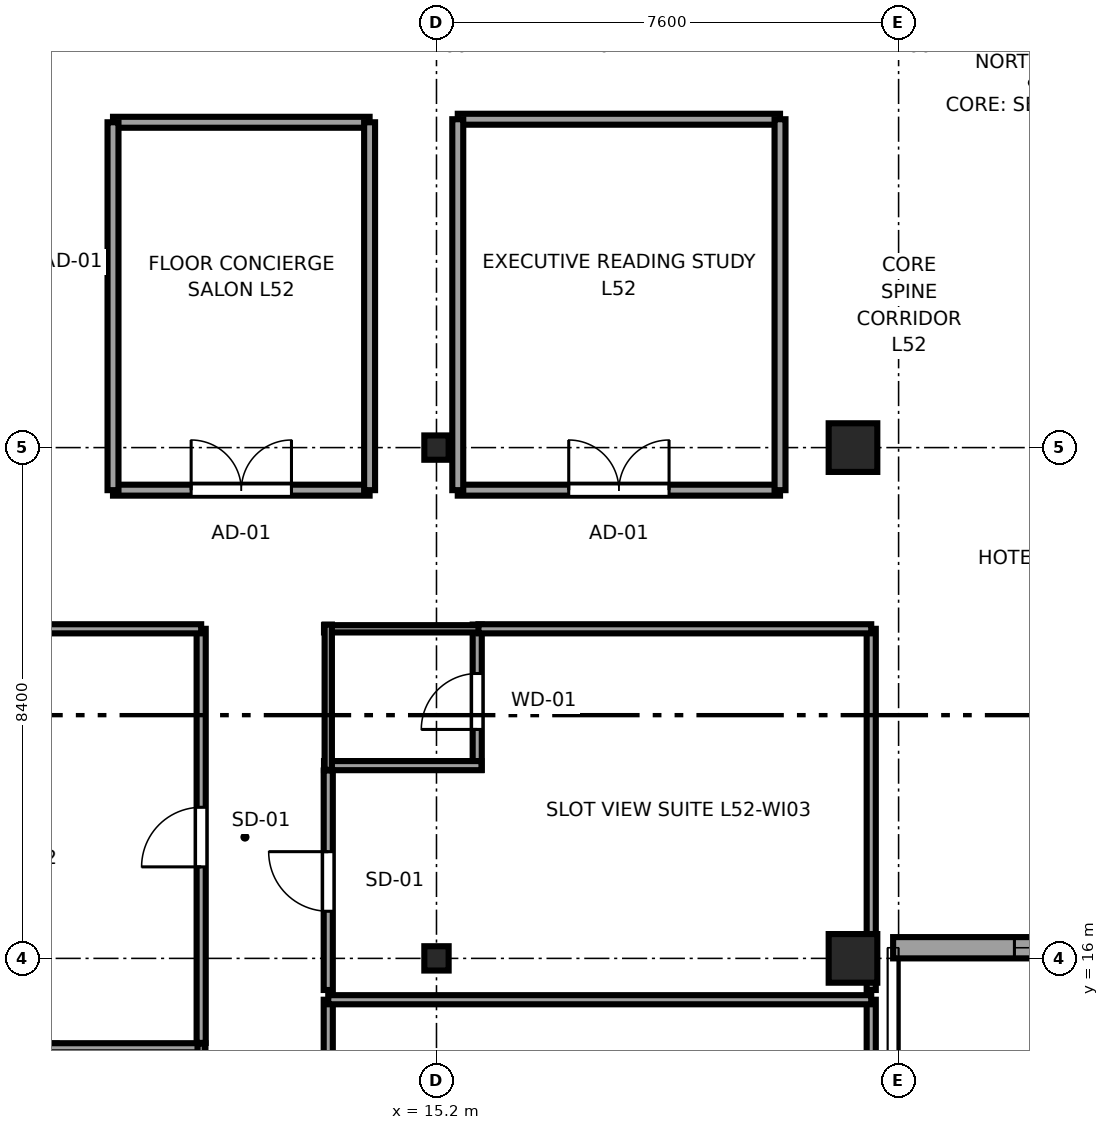
"""IFC4 building model, lengths in metres.
Left out: names, types, materials, properties, quantities, classifications, styles, units other than length and angle.
Written with IfcOpenShell. Run it as: python <this file> out.ifc"""

import sys

from ifc_helpers import new_model, si_unit, direction, frame, frame_2d, origin, origin_2d, place, context, subcontext, project, spatial, rectangle, i_section, extrude, source, transform, mapped, element, fill, save


model = new_model("IFC4")
c1 = context("Model", 3, precision=1e-05, world=origin(), true_north=direction((0.0, 1.0)))
c2 = subcontext(c1, "Body", "Model", "MODEL_VIEW")
j1 = project(units=[si_unit("LENGTHUNIT", "METRE"), si_unit("PLANEANGLEUNIT", "RADIAN")], contexts=[c1])
p1 = place(None, origin())
s1 = spatial("IfcSite", under=j1, at=p1, CompositionType="ELEMENT")
p2 = place(p1, origin())
s2 = spatial("IfcBuilding", under=s1, at=p2, CompositionType="ELEMENT")
p3 = place(p2, frame((0.0, 0.0, 198.2)))
s3 = spatial("IfcBuildingStorey", under=s2, at=p3, CompositionType="ELEMENT", Elevation=198.2)
m1 = source(origin(), c2, "Body", "SweptSolid", [
    extrude(i_section(OverallWidth=0.4, OverallDepth=0.4, WebThickness=0.02, FlangeThickness=0.035, at=origin_2d()), origin(), (0.0, 0.0, 1.0), 3.55),
])
for number, where, z_axis, x_axis in (
    (1, (15.2, 16.0, 0.0), (0.0, 0.0, 1.0), (1.0, 0.0, 0.0)),
    (2, (15.2, 24.4, 0.0), (0.0, 0.0, 1.0), (1.0, 0.0, 0.0)),
):
    element("IfcColumn", number, at=place(p3, frame(where, z_axis=z_axis, x_axis=x_axis)), inside=s3, PredefinedType="COLUMN", context=c2, shape_type="MappedRepresentation", body=[
        mapped(m1, transform((0.0, 0.0, 0.0), x_axis=(1.0, 0.0, 0.0), y_axis=(0.0, 1.0, 0.0), z_axis=(0.0, 0.0, 1.0), scale=1.0)),
    ])
m2 = source(origin(), c2, "Body", "SweptSolid", [
    extrude(rectangle(XDim=0.8, YDim=0.8, at=origin_2d()), origin(), (0.0, 0.0, 1.0), 3.55),
])
for number, where, z_axis, x_axis in (
    (3, (22.05, 16.0, 0.0), (0.0, 0.0, 1.0), (1.0, 0.0, 0.0)),
    (4, (22.05, 24.4, 0.0), (0.0, 0.0, 1.0), (1.0, 0.0, 0.0)),
):
    element("IfcColumn", number, at=place(p3, frame(where, z_axis=z_axis, x_axis=x_axis)), inside=s3, PredefinedType="COLUMN", context=c2, shape_type="MappedRepresentation", body=[
        mapped(m2, transform((0.0, 0.0, 0.0), x_axis=(1.0, 0.0, 0.0), y_axis=(0.0, 1.0, 0.0), z_axis=(0.0, 0.0, 1.0), scale=1.0)),
    ])
p4 = place(p3, frame((22.71, 16.175, 0.0), z_axis=(0.0, 0.0, 1.0), x_axis=(1.0, 0.0, 0.0)))
e5 = element("IfcWall", 5, at=p4, inside=s3, PredefinedType="SOLIDWALL", context=c2, shape_type="SweptSolid", body=[
    extrude(rectangle(XDim=11.58, YDim=0.35, at=frame_2d((5.79, 0.0))), origin(), (0.0, 0.0, 1.0), 2.758),
])
p5 = place(p4, frame((1.995, 0.0, 0.68)))
e6 = element("IfcOpeningElement", 6, at=p5, cuts=e5, PredefinedType="OPENING", context=c2, shape_type="SweptSolid", body=[
    extrude(rectangle(XDim=2.4, YDim=1.9, at=frame_2d((1.2, 0.95))), frame((0.0, 0.185, 0.0), z_axis=(0.0, -1.0, 0.0), x_axis=(1.0, 0.0, 0.0)), (0.0, 0.0, 1.0), 0.37),
])
p6 = place(p4, frame((7.185, 0.0, 0.68)))
e7 = element("IfcOpeningElement", 7, at=p6, cuts=e5, PredefinedType="OPENING", context=c2, shape_type="SweptSolid", body=[
    extrude(rectangle(XDim=2.4, YDim=1.9, at=frame_2d((1.2, 0.95))), frame((0.0, 0.185, 0.0), z_axis=(0.0, -1.0, 0.0), x_axis=(1.0, 0.0, 0.0)), (0.0, 0.0, 1.0), 0.37),
])
p7 = place(p3, frame((8.88, 12.21, 0.0), z_axis=(0.0, 0.0, 1.0), x_axis=(0.0, 1.0, 0.0)))
e8 = element("IfcWall", 8, at=p7, inside=s3, PredefinedType="PARTITIONING", context=c2, shape_type="SweptSolid", body=[
    extrude(rectangle(XDim=2.39, YDim=0.15, at=frame_2d((1.195, 0.0))), origin(), (0.0, 0.0, 1.0), 3.37),
])
p8 = place(p7, frame((0.665, 0.0, 0.0)))
e9 = element("IfcOpeningElement", 9, at=p8, cuts=e8, PredefinedType="OPENING", context=c2, shape_type="SweptSolid", body=[
    extrude(rectangle(XDim=0.92, YDim=2.01, at=frame_2d((0.46, 1.005))), frame((0.0, 0.085, 0.0), z_axis=(0.0, -1.0, 0.0), x_axis=(1.0, 0.0, 0.0)), (0.0, 0.0, 1.0), 0.17),
])
p9 = place(p3, frame((8.81, 14.53, 0.0), z_axis=(0.0, 0.0, 1.0), x_axis=(1.0, 0.0, 0.0)))
e10 = element("IfcWall", 10, at=p9, inside=s3, PredefinedType="PARTITIONING", context=c2, shape_type="SweptSolid", body=[
    extrude(rectangle(XDim=2.59, YDim=0.15, at=frame_2d((1.295, 0.0))), origin(), (0.0, 0.0, 1.0), 3.37),
])
p10 = place(p3, frame((11.33, 12.21, 0.0), z_axis=(0.0, 0.0, 1.0), x_axis=(0.0, 1.0, 0.0)))
e11 = element("IfcWall", 11, at=p10, inside=s3, PredefinedType="PLUMBINGWALL", context=c2, shape_type="SweptSolid", body=[
    extrude(rectangle(XDim=2.39, YDim=0.12, at=frame_2d((1.195, 0.0))), origin(), (0.0, 0.0, 1.0), 3.001),
])
p11 = place(p3, frame((15.87, 19.1, 0.0), z_axis=(0.0, 0.0, 1.0), x_axis=(0.0, 1.0, 0.0)))
e12 = element("IfcWall", 12, at=p11, inside=s3, PredefinedType="PARTITIONING", context=c2, shape_type="SweptSolid", body=[
    extrude(rectangle(XDim=2.39, YDim=0.15, at=frame_2d((1.195, 0.0))), origin(), (0.0, 0.0, 1.0), 3.37),
])
p12 = place(p11, frame((0.665, 0.0, 0.0)))
e13 = element("IfcOpeningElement", 13, at=p12, cuts=e12, PredefinedType="OPENING", context=c2, shape_type="SweptSolid", body=[
    extrude(rectangle(XDim=0.92, YDim=2.01, at=frame_2d((0.46, 1.005))), frame((0.0, 0.085, 0.0), z_axis=(0.0, -1.0, 0.0), x_axis=(1.0, 0.0, 0.0)), (0.0, 0.0, 1.0), 0.17),
])
p13 = place(p3, frame((13.35, 19.17, 0.0), z_axis=(0.0, 0.0, 1.0), x_axis=(1.0, 0.0, 0.0)))
e14 = element("IfcWall", 14, at=p13, inside=s3, PredefinedType="PARTITIONING", context=c2, shape_type="SweptSolid", body=[
    extrude(rectangle(XDim=2.59, YDim=0.15, at=frame_2d((1.295, 0.0))), origin(), (0.0, 0.0, 1.0), 3.37),
])
p14 = place(p3, frame((13.35, 21.42, 0.0), z_axis=(0.0, 0.0, 1.0), x_axis=(1.0, 0.0, 0.0)))
e15 = element("IfcWall", 15, at=p14, inside=s3, PredefinedType="PLUMBINGWALL", context=c2, shape_type="SweptSolid", body=[
    extrude(rectangle(XDim=2.59, YDim=0.12, at=frame_2d((1.295, 0.0))), origin(), (0.0, 0.0, 1.0), 3.37),
])
p15 = place(p3, frame((13.42, 19.1, 0.0), z_axis=(0.0, 0.0, 1.0), x_axis=(0.0, 1.0, 0.0)))
e16 = element("IfcWall", 16, at=p15, inside=s3, PredefinedType="PLUMBINGWALL", context=c2, shape_type="SweptSolid", body=[
    extrude(rectangle(XDim=2.39, YDim=0.12, at=frame_2d((1.195, 0.0))), origin(), (0.0, 0.0, 1.0), 3.37),
])
p16 = place(p3, frame((11.33, 14.61, 0.0), z_axis=(0.0, 0.0, 1.0), x_axis=(0.0, 1.0, 0.0)))
e17 = element("IfcWall", 17, at=p16, inside=s3, PredefinedType="PARTITIONING", context=c2, shape_type="SweptSolid", body=[
    extrude(rectangle(XDim=6.81, YDim=0.15, at=frame_2d((3.405, 0.0))), origin(), (0.0, 0.0, 1.0), 3.001),
])
p17 = place(p16, frame((2.895, 0.0, 0.0)))
e18 = element("IfcOpeningElement", 18, at=p17, cuts=e17, PredefinedType="OPENING", context=c2, shape_type="SweptSolid", body=[
    extrude(rectangle(XDim=0.98, YDim=2.12, at=frame_2d((0.49, 1.06))), frame((0.0, 0.085, 0.0), z_axis=(0.0, -1.0, 0.0), x_axis=(1.0, 0.0, 0.0)), (0.0, 0.0, 1.0), 0.17),
])
p18 = place(p3, frame((2.9, 21.42, 0.0), z_axis=(0.0, 0.0, 1.0), x_axis=(1.0, 0.0, 0.0)))
e19 = element("IfcWall", 19, at=p18, inside=s3, PredefinedType="PARTITIONING", context=c2, shape_type="SweptSolid", body=[
    extrude(rectangle(XDim=8.43, YDim=0.15, at=frame_2d((4.215, 0.0))), origin(), (0.0, 0.0, 1.0), 3.37),
])
p19 = place(p3, frame((13.42, 11.61, 0.0), z_axis=(0.0, 0.0, 1.0), x_axis=(0.0, 1.0, 0.0)))
e20 = element("IfcWall", 20, at=p19, inside=s3, PredefinedType="PARTITIONING", context=c2, shape_type="SweptSolid", body=[
    extrude(rectangle(XDim=3.71, YDim=0.15, at=frame_2d((1.855, 0.0))), origin(), (0.0, 0.0, 1.0), 3.37),
])
p20 = place(p19, frame((1.345, 0.0, 0.0)))
e21 = element("IfcOpeningElement", 21, at=p20, cuts=e20, PredefinedType="OPENING", context=c2, shape_type="SweptSolid", body=[
    extrude(rectangle(XDim=0.98, YDim=2.12, at=frame_2d((0.49, 1.06))), frame((0.0, 0.085, 0.0), z_axis=(0.0, -1.0, 0.0), x_axis=(1.0, 0.0, 0.0)), (0.0, 0.0, 1.0), 0.17),
])
p21 = place(p3, frame((22.35, 9.28, 0.0), z_axis=(0.0, 0.0, 1.0), x_axis=(0.0, 1.0, 0.0)))
e22 = element("IfcWall", 22, at=p21, inside=s3, PredefinedType="PARTITIONING", context=c2, shape_type="SweptSolid", body=[
    extrude(rectangle(XDim=6.04, YDim=0.15, at=frame_2d((3.02, 0.0))), origin(), (0.0, 0.0, 1.0), 3.37),
])
p22 = place(p3, frame((13.42, 15.32, 0.0), z_axis=(0.0, 0.0, 1.0), x_axis=(1.0, 0.0, 0.0)))
e23 = element("IfcWall", 23, at=p22, inside=s3, PredefinedType="PARTITIONING", context=c2, shape_type="SweptSolid", body=[
    extrude(rectangle(XDim=8.93, YDim=0.15, at=frame_2d((4.465, 0.0))), origin(), (0.0, 0.0, 1.0), 3.37),
])
p23 = place(p3, frame((13.42, 15.48, 0.0), z_axis=(0.0, 0.0, 1.0), x_axis=(0.0, 1.0, 0.0)))
e24 = element("IfcWall", 24, at=p23, inside=s3, PredefinedType="PARTITIONING", context=c2, shape_type="SweptSolid", body=[
    extrude(rectangle(XDim=3.61, YDim=0.15, at=frame_2d((1.805, 0.0))), origin(), (0.0, 0.0, 1.0), 3.37),
])
p24 = place(p23, frame((1.295, 0.0, 0.0)))
e25 = element("IfcOpeningElement", 25, at=p24, cuts=e24, PredefinedType="OPENING", context=c2, shape_type="SweptSolid", body=[
    extrude(rectangle(XDim=0.98, YDim=2.12, at=frame_2d((0.49, 1.06))), frame((0.0, 0.085, 0.0), z_axis=(0.0, -1.0, 0.0), x_axis=(1.0, 0.0, 0.0)), (0.0, 0.0, 1.0), 0.17),
])
p25 = place(p3, frame((22.35, 15.48, 0.0), z_axis=(0.0, 0.0, 1.0), x_axis=(0.0, 1.0, 0.0)))
e26 = element("IfcWall", 26, at=p25, inside=s3, PredefinedType="PARTITIONING", context=c2, shape_type="SweptSolid", body=[
    extrude(rectangle(XDim=5.94, YDim=0.15, at=frame_2d((2.97, 0.0))), origin(), (0.0, 0.0, 1.0), 3.37),
])
p26 = place(p3, frame((15.89, 21.42, 0.0), z_axis=(0.0, 0.0, 1.0), x_axis=(1.0, 0.0, 0.0)))
e27 = element("IfcWall", 27, at=p26, inside=s3, PredefinedType="PARTITIONING", context=c2, shape_type="SweptSolid", body=[
    extrude(rectangle(XDim=6.46, YDim=0.15, at=frame_2d((3.23, 0.0))), origin(), (0.0, 0.0, 1.0), 3.37),
])
p27 = place(p3, frame((9.88, 23.7, 0.0), z_axis=(0.0, 0.0, 1.0), x_axis=(1.0, 0.0, 0.0)))
e28 = element("IfcWall", 28, at=p27, inside=s3, PredefinedType="PARTITIONING", context=c2, shape_type="SweptSolid", body=[
    extrude(rectangle(XDim=4.22, YDim=0.18, at=frame_2d((2.11, 0.0))), origin(), (0.0, 0.0, 1.0), 3.37),
])
p28 = place(p27, frame((1.285, 0.0, 0.0)))
e29 = element("IfcOpeningElement", 29, at=p28, cuts=e28, PredefinedType="OPENING", context=c2, shape_type="SweptSolid", body=[
    extrude(rectangle(XDim=1.65, YDim=2.15, at=frame_2d((0.825, 1.075))), frame((0.0, 0.1, 0.0), z_axis=(0.0, -1.0, 0.0), x_axis=(1.0, 0.0, 0.0)), (0.0, 0.0, 1.0), 0.2),
])
p29 = place(p3, frame((9.88, 29.75, 0.0), z_axis=(0.0, 0.0, 1.0), x_axis=(1.0, 0.0, 0.0)))
e30 = element("IfcWall", 30, at=p29, inside=s3, PredefinedType="PARTITIONING", context=c2, shape_type="SweptSolid", body=[
    extrude(rectangle(XDim=4.22, YDim=0.18, at=frame_2d((2.11, 0.0))), origin(), (0.0, 0.0, 1.0), 3.37),
])
for number, where, z_axis, x_axis in (
    (31, (9.88, 23.7, 0.0), (0.0, 0.0, 1.0), (0.0, 1.0, 0.0)),
    (32, (14.1, 23.7, 0.0), (0.0, 0.0, 1.0), (0.0, 1.0, 0.0)),
):
    element("IfcWall", number, at=place(p3, frame(where, z_axis=z_axis, x_axis=x_axis)), inside=s3, PredefinedType="PARTITIONING", context=c2, shape_type="SweptSolid", body=[
        extrude(rectangle(XDim=6.05, YDim=0.18, at=frame_2d((3.025, 0.0))), origin(), (0.0, 0.0, 1.0), 3.37),
    ])
p30 = place(p3, frame((15.55, 23.7, 0.0), z_axis=(0.0, 0.0, 1.0), x_axis=(1.0, 0.0, 0.0)))
e33 = element("IfcWall", 33, at=p30, inside=s3, PredefinedType="PARTITIONING", context=c2, shape_type="SweptSolid", body=[
    extrude(rectangle(XDim=5.3, YDim=0.18, at=frame_2d((2.65, 0.0))), origin(), (0.0, 0.0, 1.0), 3.37),
])
p31 = place(p30, frame((1.825, 0.0, 0.0)))
e34 = element("IfcOpeningElement", 34, at=p31, cuts=e33, PredefinedType="OPENING", context=c2, shape_type="SweptSolid", body=[
    extrude(rectangle(XDim=1.65, YDim=2.15, at=frame_2d((0.825, 1.075))), frame((0.0, 0.1, 0.0), z_axis=(0.0, -1.0, 0.0), x_axis=(1.0, 0.0, 0.0)), (0.0, 0.0, 1.0), 0.2),
])
p32 = place(p3, frame((15.55, 29.8, 0.0), z_axis=(0.0, 0.0, 1.0), x_axis=(1.0, 0.0, 0.0)))
e35 = element("IfcWall", 35, at=p32, inside=s3, PredefinedType="PARTITIONING", context=c2, shape_type="SweptSolid", body=[
    extrude(rectangle(XDim=5.3, YDim=0.18, at=frame_2d((2.65, 0.0))), origin(), (0.0, 0.0, 1.0), 3.37),
])
for number, where, z_axis, x_axis in (
    (36, (15.55, 23.7, 0.0), (0.0, 0.0, 1.0), (0.0, 1.0, 0.0)),
    (37, (20.85, 23.7, 0.0), (0.0, 0.0, 1.0), (0.0, 1.0, 0.0)),
):
    element("IfcWall", number, at=place(p3, frame(where, z_axis=z_axis, x_axis=x_axis)), inside=s3, PredefinedType="PARTITIONING", context=c2, shape_type="SweptSolid", body=[
        extrude(rectangle(XDim=6.1, YDim=0.18, at=frame_2d((3.05, 0.0))), origin(), (0.0, 0.0, 1.0), 3.37),
    ])
m3 = source(origin(), c2, "Body", "SweptSolid", [
    extrude(rectangle(XDim=2.4, YDim=1.9, at=frame_2d((1.2, 0.95))), frame((0.0, 0.09, 0.0), z_axis=(0.0, -1.0, 0.0), x_axis=(1.0, 0.0, 0.0)), (0.0, 0.0, 1.0), 0.06),
])
p33 = place(p5, origin())
e38 = element("IfcWindow", 38, at=p33, inside=s3, PartitioningType="TRIPLE_PANEL_HORIZONTAL", PredefinedType="WINDOW", context=c2, shape_type="MappedRepresentation", body=[
    mapped(m3, transform((0.0, 0.0, 0.0), x_axis=(1.0, 0.0, 0.0), y_axis=(0.0, 1.0, 0.0), z_axis=(0.0, 0.0, 1.0), scale=1.0)),
])
fill(e6, e38)
m4 = source(origin(), c2, "Body", "SweptSolid", [
    extrude(rectangle(XDim=0.92, YDim=2.01, at=frame_2d((0.46, 1.005))), frame((0.0, 0.025, 0.0), z_axis=(0.0, -1.0, 0.0), x_axis=(1.0, 0.0, 0.0)), (0.0, 0.0, 1.0), 0.05),
])
p34 = place(p12, origin())
e39 = element("IfcDoor", 39, at=p34, inside=s3, OperationType="SINGLE_SWING_LEFT", PredefinedType="DOOR", context=c2, shape_type="MappedRepresentation", body=[
    mapped(m4, transform((0.0, 0.0, 0.0), x_axis=(1.0, 0.0, 0.0), y_axis=(0.0, 1.0, 0.0), z_axis=(0.0, 0.0, 1.0), scale=1.0)),
])
fill(e13, e39)
m5 = source(origin(), c2, "Body", "SweptSolid", [
    extrude(rectangle(XDim=0.98, YDim=2.12, at=frame_2d((0.49, 1.06))), frame((0.0, 0.025, 0.0), z_axis=(0.0, -1.0, 0.0), x_axis=(1.0, 0.0, 0.0)), (0.0, 0.0, 1.0), 0.05),
])
p35 = place(p17, origin())
e40 = element("IfcDoor", 40, at=p35, inside=s3, OperationType="SINGLE_SWING_LEFT", PredefinedType="DOOR", context=c2, shape_type="MappedRepresentation", body=[
    mapped(m5, transform((0.0, 0.0, 0.0), x_axis=(1.0, 0.0, 0.0), y_axis=(0.0, 1.0, 0.0), z_axis=(0.0, 0.0, 1.0), scale=1.0)),
])
fill(e18, e40)
p36 = place(p24, origin())
e41 = element("IfcDoor", 41, at=p36, inside=s3, OperationType="SINGLE_SWING_RIGHT", PredefinedType="DOOR", context=c2, shape_type="MappedRepresentation", body=[
    mapped(m5, transform((0.0, 0.0, 0.0), x_axis=(1.0, 0.0, 0.0), y_axis=(0.0, 1.0, 0.0), z_axis=(0.0, 0.0, 1.0), scale=1.0)),
])
fill(e25, e41)
m6 = source(origin(), c2, "Body", "SweptSolid", [
    extrude(rectangle(XDim=1.65, YDim=2.15, at=frame_2d((0.825, 1.075))), frame((0.0, 0.025, 0.0), z_axis=(0.0, -1.0, 0.0), x_axis=(1.0, 0.0, 0.0)), (0.0, 0.0, 1.0), 0.05),
])
p37 = place(p28, origin())
e42 = element("IfcDoor", 42, at=p37, inside=s3, OperationType="DOUBLE_DOOR_SINGLE_SWING", PredefinedType="DOOR", context=c2, shape_type="MappedRepresentation", body=[
    mapped(m6, transform((0.0, 0.0, 0.0), x_axis=(1.0, 0.0, 0.0), y_axis=(0.0, 1.0, 0.0), z_axis=(0.0, 0.0, 1.0), scale=1.0)),
])
fill(e29, e42)
p38 = place(p31, origin())
e43 = element("IfcDoor", 43, at=p38, inside=s3, OperationType="DOUBLE_DOOR_SINGLE_SWING", PredefinedType="DOOR", context=c2, shape_type="MappedRepresentation", body=[
    mapped(m6, transform((0.0, 0.0, 0.0), x_axis=(1.0, 0.0, 0.0), y_axis=(0.0, 1.0, 0.0), z_axis=(0.0, 0.0, 1.0), scale=1.0)),
])
fill(e34, e43)
save(model, sys.argv[1])
